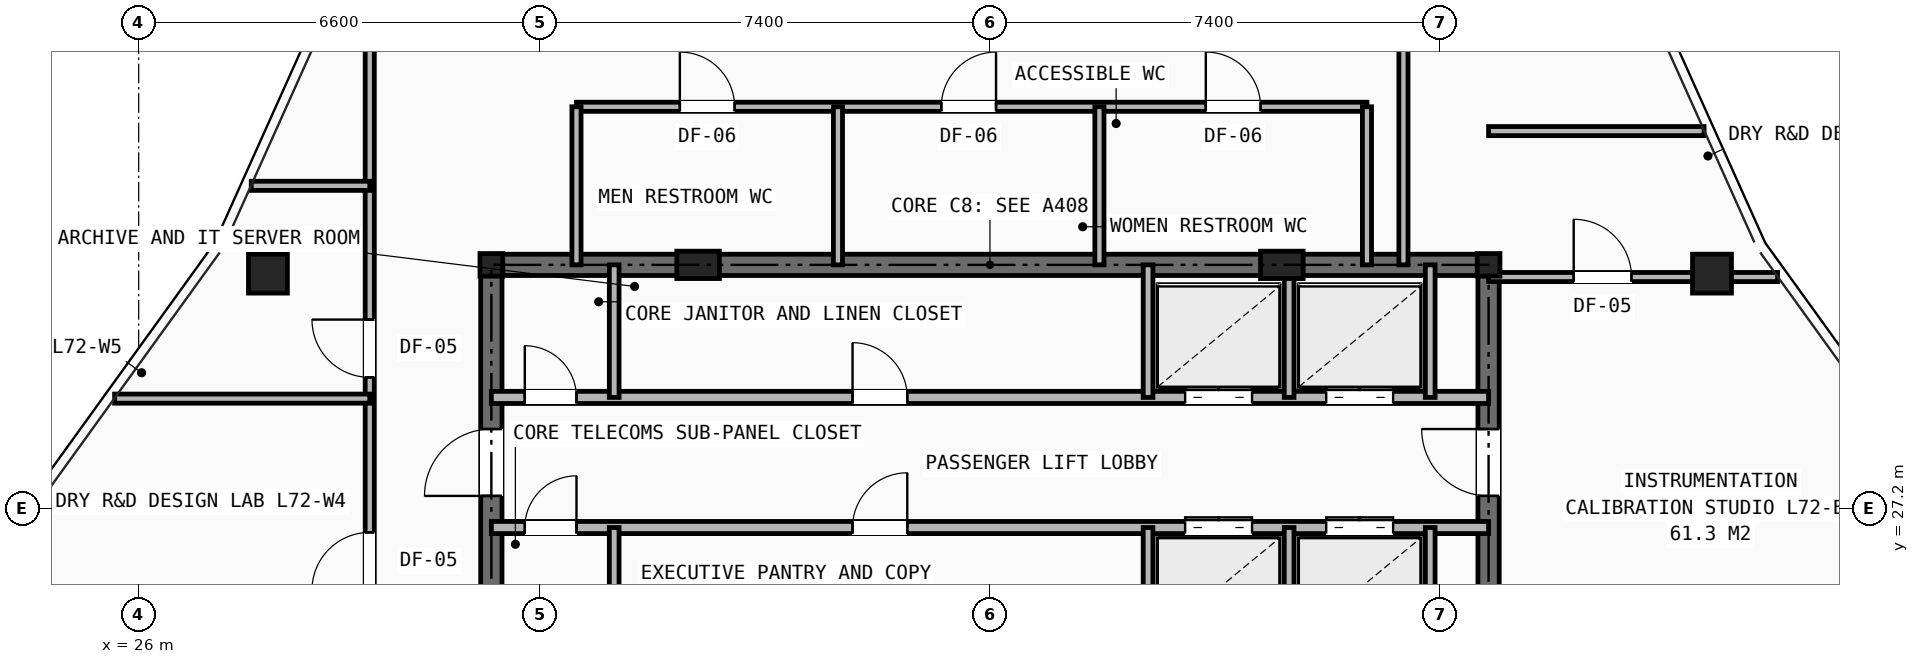
"""IFC4 building model, lengths in metres.
Left out: names, types, materials, properties, quantities, classifications, styles, units other than length and angle.
Written with IfcOpenShell. Run it as: python <this file> out.ifc"""

import sys

from ifc_helpers import new_model, si_unit, direction, frame, frame_2d, origin, origin_2d, place, context, subcontext, project, spatial, rectangle, hollow_rectangle, i_section, extrude, element, fill, save


model = new_model("IFC4")
c1 = context("Model", 3, precision=1e-05, world=origin(), true_north=direction((0.0, 1.0)))
c2 = subcontext(c1, "Body", "Model", "MODEL_VIEW")
j1 = project(units=[si_unit("LENGTHUNIT", "METRE"), si_unit("PLANEANGLEUNIT", "RADIAN")], contexts=[c1])
p1 = place(None, origin())
s1 = spatial("IfcSite", under=j1, at=p1, CompositionType="ELEMENT")
p2 = place(p1, origin())
s2 = spatial("IfcBuilding", under=s1, at=p2, CompositionType="ELEMENT")
p3 = place(p2, frame((0.0, 0.0, 255.0)))
s3 = spatial("IfcBuildingStorey", under=s2, at=p3, CompositionType="ELEMENT", Elevation=255.0)
for number, where, z_axis, x_axis in (
    (1, (31.8, 31.2, 0.0), (0.0, 0.0, 1.0), (1.0, 0.0, 0.0)),
    (2, (48.2, 31.2, 0.0), (0.0, 0.0, 1.0), (1.0, 0.0, 0.0)),
):
    element("IfcColumn", number, at=place(p3, frame(where, z_axis=z_axis, x_axis=x_axis)), inside=s3, PredefinedType="COLUMN", context=c2, shape_type="SweptSolid", body=[
        extrude(i_section(OverallWidth=0.374, OverallDepth=0.372, WebThickness=0.016, FlangeThickness=0.026, at=origin_2d()), origin(), (0.0, 0.0, 1.0), 3.5),
    ])
for number, where, z_axis, x_axis in (
    (3, (35.2, 31.2, 0.0), (0.0, 0.0, 1.0), (1.0, 0.0, 0.0)),
    (4, (44.8, 31.2, 0.0), (0.0, 0.0, 1.0), (1.0, 0.0, 0.0)),
):
    element("IfcColumn", number, at=place(p3, frame(where, z_axis=z_axis, x_axis=x_axis)), inside=s3, PredefinedType="PILASTER", context=c2, shape_type="SweptSolid", body=[
        extrude(rectangle(XDim=0.7, YDim=0.45, at=origin_2d()), origin(), (0.0, 0.0, 1.0), 3.5),
    ])
for number, where, z_axis, x_axis in (
    (5, (28.126, 31.056, 0.0), (0.0, 0.0, 1.0), (1.0, 0.0, 0.0)),
    (6, (51.874, 31.056, 0.0), (0.0, 0.0, 1.0), (1.0, 0.0, 0.0)),
):
    element("IfcColumn", number, at=place(p3, frame(where, z_axis=z_axis, x_axis=x_axis)), inside=s3, PredefinedType="COLUMN", context=c2, shape_type="SweptSolid", body=[
        extrude(hollow_rectangle(XDim=0.64, YDim=0.64, WallThickness=0.045, at=origin_2d()), origin(), (0.0, 0.0, 1.0), 3.5),
    ])
p4 = place(p3, frame((31.8, 31.2, 0.0), z_axis=(0.0, 0.0, 1.0), x_axis=(1.0, 0.0, 0.0)))
e7 = element("IfcWall", 7, at=p4, inside=s3, PredefinedType="SHEAR", context=c2, shape_type="SweptSolid", body=[
    extrude(rectangle(XDim=16.4, YDim=0.35, at=frame_2d((8.2, 0.0))), origin(), (0.0, 0.0, 1.0), 3.25),
])
p5 = place(p3, frame((31.8, 16.4, 0.0), z_axis=(0.0, 0.0, 1.0), x_axis=(0.0, 1.0, 0.0)))
e8 = element("IfcWall", 8, at=p5, inside=s3, PredefinedType="SHEAR", context=c2, shape_type="SweptSolid", body=[
    extrude(rectangle(XDim=14.8, YDim=0.35, at=frame_2d((7.4, 0.0))), origin(), (0.0, 0.0, 1.0), 3.25),
])
p6 = place(p5, frame((11.0, 0.0, 0.0)))
e9 = element("IfcOpeningElement", 9, at=p6, cuts=e8, PredefinedType="OPENING", context=c2, shape_type="SweptSolid", body=[
    extrude(rectangle(XDim=1.1, YDim=2.15, at=frame_2d((0.55, 1.075))), frame((0.0, 0.185, 0.0), z_axis=(0.0, -1.0, 0.0), x_axis=(1.0, 0.0, 0.0)), (0.0, 0.0, 1.0), 0.37),
])
p7 = place(p3, frame((48.2, 16.4, 0.0), z_axis=(0.0, 0.0, 1.0), x_axis=(0.0, 1.0, 0.0)))
e10 = element("IfcWall", 10, at=p7, inside=s3, PredefinedType="SHEAR", context=c2, shape_type="SweptSolid", body=[
    extrude(rectangle(XDim=14.8, YDim=0.35, at=frame_2d((7.4, 0.0))), origin(), (0.0, 0.0, 1.0), 3.25),
])
p8 = place(p7, frame((11.0, 0.0, 0.0)))
e11 = element("IfcOpeningElement", 11, at=p8, cuts=e10, PredefinedType="OPENING", context=c2, shape_type="SweptSolid", body=[
    extrude(rectangle(XDim=1.1, YDim=2.15, at=frame_2d((0.55, 1.075))), frame((0.0, 0.185, 0.0), z_axis=(0.0, -1.0, 0.0), x_axis=(1.0, 0.0, 0.0)), (0.0, 0.0, 1.0), 0.37),
])
p9 = place(p3, frame((31.8, 29.02, 0.0), z_axis=(0.0, 0.0, 1.0), x_axis=(1.0, 0.0, 0.0)))
e12 = element("IfcWall", 12, at=p9, inside=s3, PredefinedType="SOLIDWALL", context=c2, shape_type="SweptSolid", body=[
    extrude(rectangle(XDim=16.4, YDim=0.2, at=frame_2d((8.2, 0.0))), origin(), (0.0, 0.0, 1.0), 2.705),
])
p10 = place(p9, frame((0.55, 0.0, 0.0)))
e13 = element("IfcOpeningElement", 13, at=p10, cuts=e12, PredefinedType="OPENING", context=c2, shape_type="SweptSolid", body=[
    extrude(rectangle(XDim=0.85, YDim=2.05, at=frame_2d((0.425, 1.025))), frame((0.0, 0.11, 0.0), z_axis=(0.0, -1.0, 0.0), x_axis=(1.0, 0.0, 0.0)), (0.0, 0.0, 1.0), 0.22),
])
p11 = place(p9, frame((5.94, 0.0, 0.0)))
e14 = element("IfcOpeningElement", 14, at=p11, cuts=e12, PredefinedType="OPENING", context=c2, shape_type="SweptSolid", body=[
    extrude(rectangle(XDim=0.9, YDim=2.1, at=frame_2d((0.45, 1.05))), frame((0.0, 0.11, 0.0), z_axis=(0.0, -1.0, 0.0), x_axis=(1.0, 0.0, 0.0)), (0.0, 0.0, 1.0), 0.22),
])
p12 = place(p9, frame((11.41, 0.0, 0.0)))
e15 = element("IfcOpeningElement", 15, at=p12, cuts=e12, PredefinedType="OPENING", context=c2, shape_type="SweptSolid", body=[
    extrude(rectangle(XDim=1.1, YDim=2.15, at=frame_2d((0.55, 1.075))), frame((0.0, 0.11, 0.0), z_axis=(0.0, -1.0, 0.0), x_axis=(1.0, 0.0, 0.0)), (0.0, 0.0, 1.0), 0.22),
])
p13 = place(p9, frame((13.73, 0.0, 0.0)))
e16 = element("IfcOpeningElement", 16, at=p13, cuts=e12, PredefinedType="OPENING", context=c2, shape_type="SweptSolid", body=[
    extrude(rectangle(XDim=1.1, YDim=2.15, at=frame_2d((0.55, 1.075))), frame((0.0, 0.11, 0.0), z_axis=(0.0, -1.0, 0.0), x_axis=(1.0, 0.0, 0.0)), (0.0, 0.0, 1.0), 0.22),
])
p14 = place(p3, frame((31.8, 26.88, 0.0), z_axis=(0.0, 0.0, 1.0), x_axis=(1.0, 0.0, 0.0)))
e17 = element("IfcWall", 17, at=p14, inside=s3, PredefinedType="SOLIDWALL", context=c2, shape_type="SweptSolid", body=[
    extrude(rectangle(XDim=16.4, YDim=0.2, at=frame_2d((8.2, 0.0))), origin(), (0.0, 0.0, 1.0), 2.705),
])
p15 = place(p14, frame((0.55, 0.0, 0.0)))
e18 = element("IfcOpeningElement", 18, at=p15, cuts=e17, PredefinedType="OPENING", context=c2, shape_type="SweptSolid", body=[
    extrude(rectangle(XDim=0.85, YDim=2.05, at=frame_2d((0.425, 1.025))), frame((0.0, 0.11, 0.0), z_axis=(0.0, -1.0, 0.0), x_axis=(1.0, 0.0, 0.0)), (0.0, 0.0, 1.0), 0.22),
])
p16 = place(p14, frame((5.94, 0.0, 0.0)))
e19 = element("IfcOpeningElement", 19, at=p16, cuts=e17, PredefinedType="OPENING", context=c2, shape_type="SweptSolid", body=[
    extrude(rectangle(XDim=0.9, YDim=2.1, at=frame_2d((0.45, 1.05))), frame((0.0, 0.11, 0.0), z_axis=(0.0, -1.0, 0.0), x_axis=(1.0, 0.0, 0.0)), (0.0, 0.0, 1.0), 0.22),
])
p17 = place(p14, frame((11.41, 0.0, 0.0)))
e20 = element("IfcOpeningElement", 20, at=p17, cuts=e17, PredefinedType="OPENING", context=c2, shape_type="SweptSolid", body=[
    extrude(rectangle(XDim=1.1, YDim=2.15, at=frame_2d((0.55, 1.075))), frame((0.0, 0.11, 0.0), z_axis=(0.0, -1.0, 0.0), x_axis=(1.0, 0.0, 0.0)), (0.0, 0.0, 1.0), 0.22),
])
p18 = place(p14, frame((13.73, 0.0, 0.0)))
e21 = element("IfcOpeningElement", 21, at=p18, cuts=e17, PredefinedType="OPENING", context=c2, shape_type="SweptSolid", body=[
    extrude(rectangle(XDim=1.1, YDim=2.15, at=frame_2d((0.55, 1.075))), frame((0.0, 0.11, 0.0), z_axis=(0.0, -1.0, 0.0), x_axis=(1.0, 0.0, 0.0)), (0.0, 0.0, 1.0), 0.22),
])
p19 = place(p3, frame((33.82, 29.02, 0.0), z_axis=(0.0, 0.0, 1.0), x_axis=(0.0, 1.0, 0.0)))
e22 = element("IfcWall", 22, at=p19, inside=s3, PredefinedType="SOLIDWALL", context=c2, shape_type="SweptSolid", body=[
    extrude(rectangle(XDim=2.18, YDim=0.16, at=frame_2d((1.09, 0.0))), origin(), (0.0, 0.0, 1.0), 2.705),
])
p20 = place(p3, frame((33.82, 24.8, 0.0), z_axis=(0.0, 0.0, 1.0), x_axis=(0.0, 1.0, 0.0)))
e23 = element("IfcWall", 23, at=p20, inside=s3, PredefinedType="SOLIDWALL", context=c2, shape_type="SweptSolid", body=[
    extrude(rectangle(XDim=2.08, YDim=0.16, at=frame_2d((1.04, 0.0))), origin(), (0.0, 0.0, 1.0), 3.25),
])
for number, where, z_axis, x_axis in (
    (24, (42.6, 29.02, 0.0), (0.0, 0.0, 1.0), (0.0, 1.0, 0.0)),
    (25, (44.92, 29.02, 0.0), (0.0, 0.0, 1.0), (0.0, 1.0, 0.0)),
    (26, (47.24, 29.02, 0.0), (0.0, 0.0, 1.0), (0.0, 1.0, 0.0)),
):
    element("IfcWall", number, at=place(p3, frame(where, z_axis=z_axis, x_axis=x_axis)), inside=s3, PredefinedType="SOLIDWALL", context=c2, shape_type="SweptSolid", body=[
        extrude(rectangle(XDim=2.18, YDim=0.16, at=frame_2d((1.09, 0.0))), origin(), (0.0, 0.0, 1.0), 2.705),
    ])
for number, where, z_axis, x_axis in (
    (27, (42.6, 24.8, 0.0), (0.0, 0.0, 1.0), (0.0, 1.0, 0.0)),
    (28, (44.92, 24.8, 0.0), (0.0, 0.0, 1.0), (0.0, 1.0, 0.0)),
    (29, (47.24, 24.8, 0.0), (0.0, 0.0, 1.0), (0.0, 1.0, 0.0)),
):
    element("IfcWall", number, at=place(p3, frame(where, z_axis=z_axis, x_axis=x_axis)), inside=s3, PredefinedType="SOLIDWALL", context=c2, shape_type="SweptSolid", body=[
        extrude(rectangle(XDim=2.08, YDim=0.16, at=frame_2d((1.04, 0.0))), origin(), (0.0, 0.0, 1.0), 3.25),
    ])
p21 = place(p3, frame((33.2, 33.8, 0.0), z_axis=(0.0, 0.0, 1.0), x_axis=(1.0, 0.0, 0.0)))
e30 = element("IfcWall", 30, at=p21, inside=s3, PredefinedType="PARTITIONING", context=c2, shape_type="SweptSolid", body=[
    extrude(rectangle(XDim=13.0, YDim=0.15, at=frame_2d((6.5, 0.0))), origin(), (0.0, 0.0, 1.0), 3.25),
])
p22 = place(p21, frame((1.7, 0.0, 0.0)))
e31 = element("IfcOpeningElement", 31, at=p22, cuts=e30, PredefinedType="OPENING", context=c2, shape_type="SweptSolid", body=[
    extrude(rectangle(XDim=0.9, YDim=2.1, at=frame_2d((0.45, 1.05))), frame((0.0, 0.085, 0.0), z_axis=(0.0, -1.0, 0.0), x_axis=(1.0, 0.0, 0.0)), (0.0, 0.0, 1.0), 0.17),
])
p23 = place(p21, frame((6.0, 0.0, 0.0)))
e32 = element("IfcOpeningElement", 32, at=p23, cuts=e30, PredefinedType="OPENING", context=c2, shape_type="SweptSolid", body=[
    extrude(rectangle(XDim=0.9, YDim=2.1, at=frame_2d((0.45, 1.05))), frame((0.0, 0.085, 0.0), z_axis=(0.0, -1.0, 0.0), x_axis=(1.0, 0.0, 0.0)), (0.0, 0.0, 1.0), 0.17),
])
p24 = place(p21, frame((10.35, 0.0, 0.0)))
e33 = element("IfcOpeningElement", 33, at=p24, cuts=e30, PredefinedType="OPENING", context=c2, shape_type="SweptSolid", body=[
    extrude(rectangle(XDim=0.9, YDim=2.1, at=frame_2d((0.45, 1.05))), frame((0.0, 0.085, 0.0), z_axis=(0.0, -1.0, 0.0), x_axis=(1.0, 0.0, 0.0)), (0.0, 0.0, 1.0), 0.17),
])
for number, where, z_axis, x_axis in (
    (34, (33.2, 31.2, 0.0), (0.0, 0.0, 1.0), (0.0, 1.0, 0.0)),
    (35, (46.2, 31.2, 0.0), (0.0, 0.0, 1.0), (0.0, 1.0, 0.0)),
    (36, (37.5, 31.2, 0.0), (0.0, 0.0, 1.0), (0.0, 1.0, 0.0)),
    (37, (41.8, 31.2, 0.0), (0.0, 0.0, 1.0), (0.0, 1.0, 0.0)),
):
    element("IfcWall", number, at=place(p3, frame(where, z_axis=z_axis, x_axis=x_axis)), inside=s3, PredefinedType="PARTITIONING", context=c2, shape_type="SweptSolid", body=[
        extrude(rectangle(XDim=2.6, YDim=0.15, at=frame_2d((1.3, 0.0))), origin(), (0.0, 0.0, 1.0), 2.705),
    ])
p25 = place(p3, frame((29.8, 16.4, 0.0), z_axis=(0.0, 0.0, 1.0), x_axis=(0.0, 1.0, 0.0)))
e38 = element("IfcWall", 38, at=p25, inside=s3, PredefinedType="PARTITIONING", context=c2, shape_type="SweptSolid", body=[
    extrude(rectangle(XDim=19.3, YDim=0.15, at=frame_2d((9.65, 0.0))), origin(), (0.0, 0.0, 1.0), 2.292),
])
p26 = place(p25, frame((0.35, 0.0, 0.0)))
e39 = element("IfcOpeningElement", 39, at=p26, cuts=e38, PredefinedType="OPENING", context=c2, shape_type="SweptSolid", body=[
    extrude(rectangle(XDim=0.95, YDim=2.1, at=frame_2d((0.475, 1.05))), frame((0.0, 0.085, 0.0), z_axis=(0.0, -1.0, 0.0), x_axis=(1.0, 0.0, 0.0)), (0.0, 0.0, 1.0), 0.17),
])
p27 = place(p25, frame((2.95, 0.0, 0.0)))
e40 = element("IfcOpeningElement", 40, at=p27, cuts=e38, PredefinedType="OPENING", context=c2, shape_type="SweptSolid", body=[
    extrude(rectangle(XDim=0.95, YDim=2.1, at=frame_2d((0.475, 1.05))), frame((0.0, 0.085, 0.0), z_axis=(0.0, -1.0, 0.0), x_axis=(1.0, 0.0, 0.0)), (0.0, 0.0, 1.0), 0.17),
])
p28 = place(p25, frame((6.15, 0.0, 0.0)))
e41 = element("IfcOpeningElement", 41, at=p28, cuts=e38, PredefinedType="OPENING", context=c2, shape_type="SweptSolid", body=[
    extrude(rectangle(XDim=0.95, YDim=2.1, at=frame_2d((0.475, 1.05))), frame((0.0, 0.085, 0.0), z_axis=(0.0, -1.0, 0.0), x_axis=(1.0, 0.0, 0.0)), (0.0, 0.0, 1.0), 0.17),
])
p29 = place(p25, frame((9.45, 0.0, 0.0)))
e42 = element("IfcOpeningElement", 42, at=p29, cuts=e38, PredefinedType="OPENING", context=c2, shape_type="SweptSolid", body=[
    extrude(rectangle(XDim=0.95, YDim=2.1, at=frame_2d((0.475, 1.05))), frame((0.0, 0.085, 0.0), z_axis=(0.0, -1.0, 0.0), x_axis=(1.0, 0.0, 0.0)), (0.0, 0.0, 1.0), 0.17),
])
p30 = place(p25, frame((12.95, 0.0, 0.0)))
e43 = element("IfcOpeningElement", 43, at=p30, cuts=e38, PredefinedType="OPENING", context=c2, shape_type="SweptSolid", body=[
    extrude(rectangle(XDim=0.95, YDim=2.1, at=frame_2d((0.475, 1.05))), frame((0.0, 0.085, 0.0), z_axis=(0.0, -1.0, 0.0), x_axis=(1.0, 0.0, 0.0)), (0.0, 0.0, 1.0), 0.17),
])
p31 = place(p3, frame((46.8, 31.2, 0.0), z_axis=(0.0, 0.0, 1.0), x_axis=(0.0, 1.0, 0.0)))
e44 = element("IfcWall", 44, at=p31, inside=s3, PredefinedType="PARTITIONING", context=c2, shape_type="SweptSolid", body=[
    extrude(rectangle(XDim=4.5, YDim=0.15, at=frame_2d((2.25, 0.0))), origin(), (0.0, 0.0, 1.0), 2.705),
])
p32 = place(p3, frame((25.604, 29.0, 0.0), z_axis=(0.0, 0.0, 1.0), x_axis=(1.0, 0.0, 0.0)))
e45 = element("IfcWall", 45, at=p32, inside=s3, PredefinedType="PARTITIONING", context=c2, shape_type="SweptSolid", body=[
    extrude(rectangle(XDim=4.196, YDim=0.15, at=frame_2d((2.098, 0.0))), origin(), (0.0, 0.0, 1.0), 2.628),
])
p33 = place(p3, frame((27.852, 32.5, 0.0), z_axis=(0.0, 0.0, 1.0), x_axis=(1.0, 0.0, 0.0)))
e46 = element("IfcWall", 46, at=p33, inside=s3, PredefinedType="PARTITIONING", context=c2, shape_type="SweptSolid", body=[
    extrude(rectangle(XDim=1.948, YDim=0.15, at=frame_2d((0.974, 0.0))), origin(), (0.0, 0.0, 1.0), 2.628),
])
p34 = place(p3, frame((48.2, 31.0, 0.0), z_axis=(0.0, 0.0, 1.0), x_axis=(1.0, 0.0, 0.0)))
e47 = element("IfcWall", 47, at=p34, inside=s3, PredefinedType="PARTITIONING", context=c2, shape_type="SweptSolid", body=[
    extrude(rectangle(XDim=4.752, YDim=0.15, at=frame_2d((2.376, 0.0))), origin(), (0.0, 0.0, 1.0), 2.292),
])
p35 = place(p34, frame((1.4, 0.0, 0.0)))
e48 = element("IfcOpeningElement", 48, at=p35, cuts=e47, PredefinedType="OPENING", context=c2, shape_type="SweptSolid", body=[
    extrude(rectangle(XDim=0.95, YDim=2.1, at=frame_2d((0.475, 1.05))), frame((0.0, 0.085, 0.0), z_axis=(0.0, -1.0, 0.0), x_axis=(1.0, 0.0, 0.0)), (0.0, 0.0, 1.0), 0.17),
])
p36 = place(p3, frame((48.2, 33.4, 0.0), z_axis=(0.0, 0.0, 1.0), x_axis=(1.0, 0.0, 0.0)))
e49 = element("IfcWall", 49, at=p36, inside=s3, PredefinedType="PARTITIONING", context=c2, shape_type="SweptSolid", body=[
    extrude(rectangle(XDim=3.544, YDim=0.15, at=frame_2d((1.772, 0.0))), origin(), (0.0, 0.0, 1.0), 2.628),
])
p37 = place(p10, origin())
e50 = element("IfcDoor", 50, at=p37, inside=s3, OperationType="SINGLE_SWING_LEFT", PredefinedType="DOOR", context=c2, shape_type="SweptSolid", body=[
    extrude(rectangle(XDim=0.85, YDim=2.05, at=frame_2d((0.425, 1.025))), frame((0.0, 0.025, 0.0), z_axis=(0.0, -1.0, 0.0), x_axis=(1.0, 0.0, 0.0)), (0.0, 0.0, 1.0), 0.05),
])
fill(e13, e50)
p38 = place(p15, origin())
e51 = element("IfcDoor", 51, at=p38, inside=s3, OperationType="SINGLE_SWING_RIGHT", PredefinedType="DOOR", context=c2, shape_type="SweptSolid", body=[
    extrude(rectangle(XDim=0.85, YDim=2.05, at=frame_2d((0.425, 1.025))), frame((0.0, 0.025, 0.0), z_axis=(0.0, -1.0, 0.0), x_axis=(1.0, 0.0, 0.0)), (0.0, 0.0, 1.0), 0.05),
])
fill(e18, e51)
p39 = place(p6, origin())
e52 = element("IfcDoor", 52, at=p39, inside=s3, OperationType="SINGLE_SWING_LEFT", PredefinedType="DOOR", context=c2, shape_type="SweptSolid", body=[
    extrude(rectangle(XDim=1.1, YDim=2.15, at=frame_2d((0.55, 1.075))), frame((0.0, 0.025, 0.0), z_axis=(0.0, -1.0, 0.0), x_axis=(1.0, 0.0, 0.0)), (0.0, 0.0, 1.0), 0.05),
])
fill(e9, e52)
p40 = place(p8, origin())
e53 = element("IfcDoor", 53, at=p40, inside=s3, OperationType="SINGLE_SWING_RIGHT", PredefinedType="DOOR", context=c2, shape_type="SweptSolid", body=[
    extrude(rectangle(XDim=1.1, YDim=2.15, at=frame_2d((0.55, 1.075))), frame((0.0, 0.025, 0.0), z_axis=(0.0, -1.0, 0.0), x_axis=(1.0, 0.0, 0.0)), (0.0, 0.0, 1.0), 0.05),
])
fill(e11, e53)
p41 = place(p11, origin())
e54 = element("IfcDoor", 54, at=p41, inside=s3, OperationType="SINGLE_SWING_LEFT", PredefinedType="DOOR", context=c2, shape_type="SweptSolid", body=[
    extrude(rectangle(XDim=0.9, YDim=2.1, at=frame_2d((0.45, 1.05))), frame((0.0, 0.025, 0.0), z_axis=(0.0, -1.0, 0.0), x_axis=(1.0, 0.0, 0.0)), (0.0, 0.0, 1.0), 0.05),
])
fill(e14, e54)
p42 = place(p16, origin())
e55 = element("IfcDoor", 55, at=p42, inside=s3, OperationType="SINGLE_SWING_RIGHT", PredefinedType="DOOR", context=c2, shape_type="SweptSolid", body=[
    extrude(rectangle(XDim=0.9, YDim=2.1, at=frame_2d((0.45, 1.05))), frame((0.0, 0.025, 0.0), z_axis=(0.0, -1.0, 0.0), x_axis=(1.0, 0.0, 0.0)), (0.0, 0.0, 1.0), 0.05),
])
fill(e19, e55)
p43 = place(p12, origin())
e56 = element("IfcDoor", 56, at=p43, inside=s3, OperationType="DOUBLE_DOOR_SLIDING", PredefinedType="DOOR", context=c2, shape_type="SweptSolid", body=[
    extrude(rectangle(XDim=1.1, YDim=2.15, at=frame_2d((0.55, 1.075))), frame((0.0, 0.025, 0.0), z_axis=(0.0, -1.0, 0.0), x_axis=(1.0, 0.0, 0.0)), (0.0, 0.0, 1.0), 0.05),
])
fill(e15, e56)
p44 = place(p13, origin())
e57 = element("IfcDoor", 57, at=p44, inside=s3, OperationType="DOUBLE_DOOR_SLIDING", PredefinedType="DOOR", context=c2, shape_type="SweptSolid", body=[
    extrude(rectangle(XDim=1.1, YDim=2.15, at=frame_2d((0.55, 1.075))), frame((0.0, 0.025, 0.0), z_axis=(0.0, -1.0, 0.0), x_axis=(1.0, 0.0, 0.0)), (0.0, 0.0, 1.0), 0.05),
])
fill(e16, e57)
p45 = place(p17, origin())
e58 = element("IfcDoor", 58, at=p45, inside=s3, OperationType="DOUBLE_DOOR_SLIDING", PredefinedType="DOOR", context=c2, shape_type="SweptSolid", body=[
    extrude(rectangle(XDim=1.1, YDim=2.15, at=frame_2d((0.55, 1.075))), frame((0.0, 0.025, 0.0), z_axis=(0.0, -1.0, 0.0), x_axis=(1.0, 0.0, 0.0)), (0.0, 0.0, 1.0), 0.05),
])
fill(e20, e58)
p46 = place(p18, origin())
e59 = element("IfcDoor", 59, at=p46, inside=s3, OperationType="DOUBLE_DOOR_SLIDING", PredefinedType="DOOR", context=c2, shape_type="SweptSolid", body=[
    extrude(rectangle(XDim=1.1, YDim=2.15, at=frame_2d((0.55, 1.075))), frame((0.0, 0.025, 0.0), z_axis=(0.0, -1.0, 0.0), x_axis=(1.0, 0.0, 0.0)), (0.0, 0.0, 1.0), 0.05),
])
fill(e21, e59)
p47 = place(p22, origin())
e60 = element("IfcDoor", 60, at=p47, inside=s3, OperationType="SINGLE_SWING_LEFT", PredefinedType="DOOR", context=c2, shape_type="SweptSolid", body=[
    extrude(rectangle(XDim=0.9, YDim=2.1, at=frame_2d((0.45, 1.05))), frame((0.0, 0.025, 0.0), z_axis=(0.0, -1.0, 0.0), x_axis=(1.0, 0.0, 0.0)), (0.0, 0.0, 1.0), 0.05),
])
fill(e31, e60)
p48 = place(p23, origin())
e61 = element("IfcDoor", 61, at=p48, inside=s3, OperationType="SINGLE_SWING_RIGHT", PredefinedType="DOOR", context=c2, shape_type="SweptSolid", body=[
    extrude(rectangle(XDim=0.9, YDim=2.1, at=frame_2d((0.45, 1.05))), frame((0.0, 0.025, 0.0), z_axis=(0.0, -1.0, 0.0), x_axis=(1.0, 0.0, 0.0)), (0.0, 0.0, 1.0), 0.05),
])
fill(e32, e61)
p49 = place(p24, origin())
e62 = element("IfcDoor", 62, at=p49, inside=s3, OperationType="SINGLE_SWING_LEFT", PredefinedType="DOOR", context=c2, shape_type="SweptSolid", body=[
    extrude(rectangle(XDim=0.9, YDim=2.1, at=frame_2d((0.45, 1.05))), frame((0.0, 0.025, 0.0), z_axis=(0.0, -1.0, 0.0), x_axis=(1.0, 0.0, 0.0)), (0.0, 0.0, 1.0), 0.05),
])
fill(e33, e62)
p50 = place(p29, origin())
e63 = element("IfcDoor", 63, at=p50, inside=s3, OperationType="SINGLE_SWING_LEFT", PredefinedType="DOOR", context=c2, shape_type="SweptSolid", body=[
    extrude(rectangle(XDim=0.95, YDim=2.1, at=frame_2d((0.475, 1.05))), frame((0.0, 0.025, 0.0), z_axis=(0.0, -1.0, 0.0), x_axis=(1.0, 0.0, 0.0)), (0.0, 0.0, 1.0), 0.05),
])
fill(e42, e63)
p51 = place(p30, origin())
e64 = element("IfcDoor", 64, at=p51, inside=s3, OperationType="SINGLE_SWING_RIGHT", PredefinedType="DOOR", context=c2, shape_type="SweptSolid", body=[
    extrude(rectangle(XDim=0.95, YDim=2.1, at=frame_2d((0.475, 1.05))), frame((0.0, 0.025, 0.0), z_axis=(0.0, -1.0, 0.0), x_axis=(1.0, 0.0, 0.0)), (0.0, 0.0, 1.0), 0.05),
])
fill(e43, e64)
p52 = place(p35, origin())
e65 = element("IfcDoor", 65, at=p52, inside=s3, OperationType="SINGLE_SWING_LEFT", PredefinedType="DOOR", context=c2, shape_type="SweptSolid", body=[
    extrude(rectangle(XDim=0.95, YDim=2.1, at=frame_2d((0.475, 1.05))), frame((0.0, 0.025, 0.0), z_axis=(0.0, -1.0, 0.0), x_axis=(1.0, 0.0, 0.0)), (0.0, 0.0, 1.0), 0.05),
])
fill(e48, e65)
save(model, sys.argv[1])
